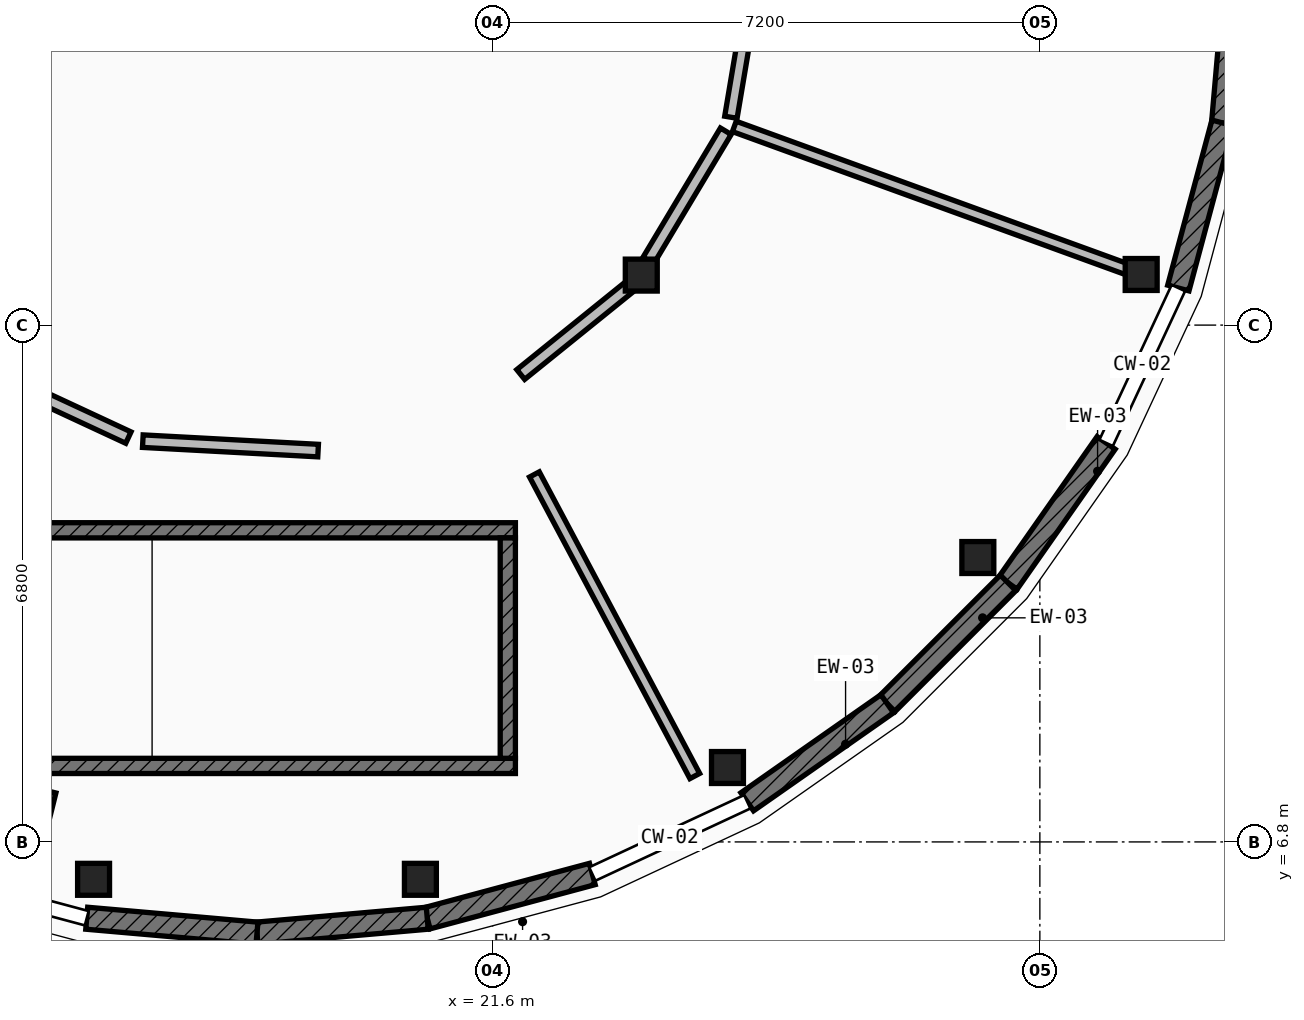
"""IFC4 building model, lengths in metres.
Left out: names, types, materials, properties, quantities, classifications, styles, units other than length and angle.
Written with IfcOpenShell. Run it as: python <this file> out.ifc"""

import sys

from ifc_helpers import new_model, si_unit, direction, frame, frame_2d, origin, origin_2d, place, context, subcontext, project, spatial, rectangle, extrude, element, fill, save


model = new_model("IFC4")
c1 = context("Model", 3, precision=1e-05, world=origin(), true_north=direction((0.0, 1.0)))
c2 = subcontext(c1, "Body", "Model", "MODEL_VIEW")
j1 = project(units=[si_unit("LENGTHUNIT", "METRE"), si_unit("PLANEANGLEUNIT", "RADIAN")], contexts=[c1])
p1 = place(None, origin())
s1 = spatial("IfcSite", under=j1, at=p1, CompositionType="ELEMENT")
p2 = place(p1, origin())
s2 = spatial("IfcBuilding", under=s1, at=p2, CompositionType="ELEMENT")
p3 = place(p2, frame((0.0, 0.0, 4.55)))
s3 = spatial("IfcBuildingStorey", under=s2, at=p3, CompositionType="ELEMENT", Elevation=4.55)
for number, where, z_axis, x_axis in (
    (1, (16.35, 6.308, 0.0), (0.0, 0.0, 1.0), (1.0, 0.0, 0.0)),
    (2, (20.65, 6.308, 0.0), (0.0, 0.0, 1.0), (1.0, 0.0, 0.0)),
    (3, (24.69, 7.779, 0.0), (0.0, 0.0, 1.0), (1.0, 0.0, 0.0)),
    (4, (27.984, 10.542, 0.0), (0.0, 0.0, 1.0), (1.0, 0.0, 0.0)),
    (5, (30.133, 14.266, 0.0), (0.0, 0.0, 1.0), (1.0, 0.0, 0.0)),
    (6, (23.556, 14.258, 0.0), (0.0, 0.0, 1.0), (1.0, 0.0, 0.0)),
):
    element("IfcColumn", number, at=place(p3, frame(where, z_axis=z_axis, x_axis=x_axis)), inside=s3, PredefinedType="COLUMN", context=c2, shape_type="SweptSolid", body=[
        extrude(rectangle(XDim=0.42, YDim=0.42, at=origin_2d()), origin(), (0.0, 0.0, 1.0), 4.2),
    ])
p4 = place(p3, frame((31.4, 18.5, 0.0), z_axis=(0.0, 0.0, 1.0), x_axis=(-0.087079400775, -0.996201374201, 0.0)))
e7 = element("IfcWall", 7, at=p4, inside=s3, PredefinedType="ELEMENTEDWALL", context=c2, shape_type="SweptSolid", body=[
    extrude(rectangle(XDim=2.249, YDim=0.29, at=frame_2d((1.124, 0.0))), origin(), (0.0, 0.0, 1.0), 3.309),
])
p5 = place(p4, frame((0.574, 0.0, 0.85)))
e8 = element("IfcOpeningElement", 8, at=p5, cuts=e7, PredefinedType="OPENING", context=c2, shape_type="SweptSolid", body=[
    extrude(rectangle(XDim=1.1, YDim=1.5, at=frame_2d((0.55, 0.75))), frame((0.0, 0.155, 0.0), z_axis=(0.0, -1.0, 0.0), x_axis=(1.0, 0.0, 0.0)), (0.0, 0.0, 1.0), 0.31),
])
p6 = place(p3, frame((31.204, 16.26, 0.0), z_axis=(0.0, 0.0, 1.0), x_axis=(-0.258824721145, -0.96592430538, 0.0)))
e9 = element("IfcWall", 9, at=p6, inside=s3, PredefinedType="ELEMENTEDWALL", context=c2, shape_type="SweptSolid", body=[
    extrude(rectangle(XDim=2.249, YDim=0.29, at=frame_2d((1.125, 0.0))), origin(), (0.0, 0.0, 1.0), 3.309),
])
p7 = place(p6, frame((0.574, 0.0, 0.85)))
e10 = element("IfcOpeningElement", 10, at=p7, cuts=e9, PredefinedType="OPENING", context=c2, shape_type="SweptSolid", body=[
    extrude(rectangle(XDim=1.1, YDim=1.85, at=frame_2d((0.55, 0.925))), frame((0.0, 0.155, 0.0), z_axis=(0.0, -1.0, 0.0), x_axis=(1.0, 0.0, 0.0)), (0.0, 0.0, 1.0), 0.31),
])
p8 = place(p3, frame((29.672, 12.05, 0.0), z_axis=(0.0, 0.0, 1.0), x_axis=(-0.573644482107, -0.819104393925, 0.0)))
e11 = element("IfcWall", 11, at=p8, inside=s3, PredefinedType="ELEMENTEDWALL", context=c2, shape_type="SweptSolid", body=[
    extrude(rectangle(XDim=2.249, YDim=0.29, at=frame_2d((1.125, 0.0))), origin(), (0.0, 0.0, 1.0), 3.309),
])
p9 = place(p8, frame((0.574, 0.0, 0.85)))
e12 = element("IfcOpeningElement", 12, at=p9, cuts=e11, PredefinedType="OPENING", context=c2, shape_type="SweptSolid", body=[
    extrude(rectangle(XDim=1.1, YDim=2.1, at=frame_2d((0.55, 1.05))), frame((0.0, 0.155, 0.0), z_axis=(0.0, -1.0, 0.0), x_axis=(1.0, 0.0, 0.0)), (0.0, 0.0, 1.0), 0.31),
])
p10 = place(p3, frame((28.382, 10.208, 0.0), z_axis=(0.0, 0.0, 1.0), x_axis=(-0.707106781187, -0.707106781187, 0.0)))
e13 = element("IfcWall", 13, at=p10, inside=s3, PredefinedType="ELEMENTEDWALL", context=c2, shape_type="SweptSolid", body=[
    extrude(rectangle(XDim=2.249, YDim=0.29, at=frame_2d((1.125, 0.0))), origin(), (0.0, 0.0, 1.0), 3.309),
])
p11 = place(p10, frame((0.564, 0.0, 0.85)))
e14 = element("IfcOpeningElement", 14, at=p11, cuts=e13, PredefinedType="OPENING", context=c2, shape_type="SweptSolid", body=[
    extrude(rectangle(XDim=1.12, YDim=1.65, at=frame_2d((0.56, 0.825))), frame((0.0, 0.155, 0.0), z_axis=(0.0, -1.0, 0.0), x_axis=(1.0, 0.0, 0.0)), (0.0, 0.0, 1.0), 0.31),
])
p12 = place(p3, frame((26.792, 8.618, 0.0), z_axis=(0.0, 0.0, 1.0), x_axis=(-0.819104393925, -0.573644482107, 0.0)))
e15 = element("IfcWall", 15, at=p12, inside=s3, PredefinedType="ELEMENTEDWALL", context=c2, shape_type="SweptSolid", body=[
    extrude(rectangle(XDim=2.249, YDim=0.29, at=frame_2d((1.125, 0.0))), origin(), (0.0, 0.0, 1.0), 3.309),
])
p13 = place(p12, frame((0.549, 0.0, 0.85)))
e16 = element("IfcOpeningElement", 16, at=p13, cuts=e15, PredefinedType="OPENING", context=c2, shape_type="SweptSolid", body=[
    extrude(rectangle(XDim=1.15, YDim=1.4, at=frame_2d((0.575, 0.7))), frame((0.0, 0.155, 0.0), z_axis=(0.0, -1.0, 0.0), x_axis=(1.0, 0.0, 0.0)), (0.0, 0.0, 1.0), 0.31),
])
p14 = place(p3, frame((22.912, 6.378, 0.0), z_axis=(0.0, 0.0, 1.0), x_axis=(-0.96592430538, -0.258824721145, 0.0)))
e17 = element("IfcWall", 17, at=p14, inside=s3, PredefinedType="ELEMENTEDWALL", context=c2, shape_type="SweptSolid", body=[
    extrude(rectangle(XDim=2.249, YDim=0.29, at=frame_2d((1.125, 0.0))), origin(), (0.0, 0.0, 1.0), 3.309),
])
p15 = place(p14, frame((0.549, 0.0, 0.85)))
e18 = element("IfcOpeningElement", 18, at=p15, cuts=e17, PredefinedType="OPENING", context=c2, shape_type="SweptSolid", body=[
    extrude(rectangle(XDim=1.15, YDim=1.7, at=frame_2d((0.575, 0.85))), frame((0.0, 0.155, 0.0), z_axis=(0.0, -1.0, 0.0), x_axis=(1.0, 0.0, 0.0)), (0.0, 0.0, 1.0), 0.31),
])
for number, where, z_axis, x_axis in (
    (19, (20.74, 5.796, 0.0), (0.0, 0.0, 1.0), (-0.996, -0.087, 0.0)),
    (20, (18.5, 5.6, 0.0), (0.0, 0.0, 1.0), (-0.996, 0.087, 0.0)),
):
    element("IfcWall", number, at=place(p3, frame(where, z_axis=z_axis, x_axis=x_axis)), inside=s3, PredefinedType="ELEMENTEDWALL", context=c2, shape_type="SweptSolid", body=[
        extrude(rectangle(XDim=2.249, YDim=0.29, at=frame_2d((1.124, 0.0))), origin(), (0.0, 0.0, 1.0), 3.309),
    ])
p16 = place(p3, frame((21.9, 10.9, 0.0), z_axis=(0.0, 0.0, 1.0), x_axis=(-1.0, 0.0, 0.0)))
e21 = element("IfcWall", 21, at=p16, inside=s3, PredefinedType="SHEAR", context=c2, shape_type="SweptSolid", body=[
    extrude(rectangle(XDim=6.8, YDim=0.2, at=frame_2d((3.4, 0.0))), origin(), (0.0, 0.0, 1.0), 3.955),
])
p17 = place(p16, frame((0.38, 0.0, 0.0)))
e22 = element("IfcOpeningElement", 22, at=p17, cuts=e21, PredefinedType="OPENING", context=c2, shape_type="SweptSolid", body=[
    extrude(rectangle(XDim=1.05, YDim=2.15, at=frame_2d((0.525, 1.075))), frame((0.0, 0.11, 0.0), z_axis=(0.0, -1.0, 0.0), x_axis=(1.0, 0.0, 0.0)), (0.0, 0.0, 1.0), 0.22),
])
p18 = place(p3, frame((21.9, 7.8, 0.0), z_axis=(0.0, 0.0, 1.0), x_axis=(-1.0, 0.0, 0.0)))
e23 = element("IfcWall", 23, at=p18, inside=s3, PredefinedType="SHEAR", context=c2, shape_type="SweptSolid", body=[
    extrude(rectangle(XDim=6.8, YDim=0.2, at=frame_2d((3.4, 0.0))), origin(), (0.0, 0.0, 1.0), 3.955),
])
p19 = place(p3, frame((21.8, 10.8, 0.0), z_axis=(0.0, 0.0, 1.0), x_axis=(0.0, -1.0, 0.0)))
e24 = element("IfcWall", 24, at=p19, inside=s3, PredefinedType="SHEAR", context=c2, shape_type="SweptSolid", body=[
    extrude(rectangle(XDim=2.9, YDim=0.2, at=frame_2d((1.45, 0.0))), origin(), (0.0, 0.0, 1.0), 3.955),
])
p20 = place(p3, frame((15.75, 7.47, 0.0), z_axis=(0.0, 0.0, 1.0), x_axis=(-0.241627935272, -0.970368971524, 0.0)))
e25 = element("IfcWall", 25, at=p20, inside=s3, PredefinedType="SOLIDWALL", context=c2, shape_type="SweptSolid", body=[
    extrude(rectangle(XDim=0.886, YDim=0.215, at=frame_2d((0.443, 0.0))), origin(), (0.0, 0.0, 1.0), 3.284),
])
p21 = place(p3, frame((22.15, 11.635, 0.0), z_axis=(0.0, 0.0, 1.0), x_axis=(0.469519274504, -0.882922222435, 0.0)))
e26 = element("IfcWall", 26, at=p21, inside=s3, PredefinedType="PARTITIONING", context=c2, shape_type="SweptSolid", body=[
    extrude(rectangle(XDim=4.494, YDim=0.145, at=frame_2d((2.247, 0.0))), origin(), (0.0, 0.0, 1.0), 3.284),
])
p22 = place(p3, frame((24.78, 16.214, 0.0), z_axis=(0.0, 0.0, 1.0), x_axis=(0.939718505705, -0.341949016719, 0.0)))
e27 = element("IfcWall", 27, at=p22, inside=s3, PredefinedType="PARTITIONING", context=c2, shape_type="SweptSolid", body=[
    extrude(rectangle(XDim=5.615, YDim=0.145, at=frame_2d((2.808, 0.0))), origin(), (0.0, 0.0, 1.0), 3.284),
])
for number, where, z_axis, x_axis in (
    (28, (14.714, 13.094, 0.0), (0.0, 0.0, 1.0), (0.907, -0.422, 0.0)),
    (29, (16.998, 12.073, 0.0), (0.0, 0.0, 1.0), (0.999, -0.054, 0.0)),
):
    element("IfcWall", number, at=place(p3, frame(where, z_axis=z_axis, x_axis=x_axis)), inside=s3, PredefinedType="PARTITIONING", context=c2, shape_type="SweptSolid", body=[
        extrude(rectangle(XDim=2.309, YDim=0.165, at=frame_2d((1.155, 0.0))), origin(), (0.0, 0.0, 1.0), 3.284),
    ])
p23 = place(p3, frame((21.97, 12.95, 0.0), z_axis=(0.0, 0.0, 1.0), x_axis=(0.778080714505, 0.62816431108, 0.0)))
e30 = element("IfcWall", 30, at=p23, inside=s3, PredefinedType="PARTITIONING", context=c2, shape_type="SweptSolid", body=[
    extrude(rectangle(XDim=1.842, YDim=0.165, at=frame_2d((0.921, 0.0))), origin(), (0.0, 0.0, 1.0), 3.284),
])
p24 = place(p23, frame((0.466, 0.0, 0.0)))
e31 = element("IfcOpeningElement", 31, at=p24, cuts=e30, PredefinedType="OPENING", context=c2, shape_type="SweptSolid", body=[
    extrude(rectangle(XDim=0.91, YDim=2.15, at=frame_2d((0.455, 1.075))), frame((0.0, 0.093, 0.0), z_axis=(0.0, -1.0, 0.0), x_axis=(1.0, 0.0, 0.0)), (0.0, 0.0, 1.0), 0.185),
])
p25 = place(p3, frame((23.65, 14.451, 0.0), z_axis=(0.0, 0.0, 1.0), x_axis=(0.513788930693, 0.85791662456, 0.0)))
e32 = element("IfcWall", 32, at=p25, inside=s3, PredefinedType="PARTITIONING", context=c2, shape_type="SweptSolid", body=[
    extrude(rectangle(XDim=1.981, YDim=0.165, at=frame_2d((0.991, 0.0))), origin(), (0.0, 0.0, 1.0), 3.284),
])
p26 = place(p3, frame((24.735, 16.335, 0.0), z_axis=(0.0, 0.0, 1.0), x_axis=(0.166037850653, 0.986119380273, 0.0)))
e33 = element("IfcWall", 33, at=p26, inside=s3, PredefinedType="PARTITIONING", context=c2, shape_type="SweptSolid", body=[
    extrude(rectangle(XDim=1.981, YDim=0.165, at=frame_2d((0.99, 0.0))), origin(), (0.0, 0.0, 1.0), 3.284),
])
p27 = place(p26, frame((0.525, 0.0, 0.0)))
e34 = element("IfcOpeningElement", 34, at=p27, cuts=e33, PredefinedType="OPENING", context=c2, shape_type="SweptSolid", body=[
    extrude(rectangle(XDim=0.93, YDim=2.18, at=frame_2d((0.465, 1.09))), frame((0.0, 0.093, 0.0), z_axis=(0.0, -1.0, 0.0), x_axis=(1.0, 0.0, 0.0)), (0.0, 0.0, 1.0), 0.185),
])
p28 = place(p7, origin())
e35 = element("IfcWindow", 35, at=p28, inside=s3, PartitioningType="SINGLE_PANEL", PredefinedType="WINDOW", context=c2, shape_type="SweptSolid", body=[
    extrude(rectangle(XDim=1.1, YDim=1.85, at=frame_2d((0.55, 0.925))), frame((0.0, 0.03, 0.0), z_axis=(0.0, -1.0, 0.0), x_axis=(1.0, 0.0, 0.0)), (0.0, 0.0, 1.0), 0.06),
])
fill(e10, e35)
p29 = place(p9, origin())
e36 = element("IfcWindow", 36, at=p29, inside=s3, PartitioningType="SINGLE_PANEL", PredefinedType="WINDOW", context=c2, shape_type="SweptSolid", body=[
    extrude(rectangle(XDim=1.1, YDim=2.1, at=frame_2d((0.55, 1.05))), frame((0.0, 0.03, 0.0), z_axis=(0.0, -1.0, 0.0), x_axis=(1.0, 0.0, 0.0)), (0.0, 0.0, 1.0), 0.06),
])
fill(e12, e36)
p30 = place(p11, origin())
e37 = element("IfcWindow", 37, at=p30, inside=s3, PartitioningType="SINGLE_PANEL", PredefinedType="WINDOW", context=c2, shape_type="SweptSolid", body=[
    extrude(rectangle(XDim=1.12, YDim=1.65, at=frame_2d((0.56, 0.825))), frame((0.0, 0.03, 0.0), z_axis=(0.0, -1.0, 0.0), x_axis=(1.0, 0.0, 0.0)), (0.0, 0.0, 1.0), 0.06),
])
fill(e14, e37)
p31 = place(p13, origin())
e38 = element("IfcWindow", 38, at=p31, inside=s3, PartitioningType="SINGLE_PANEL", PredefinedType="WINDOW", context=c2, shape_type="SweptSolid", body=[
    extrude(rectangle(XDim=1.15, YDim=1.4, at=frame_2d((0.575, 0.7))), frame((0.0, 0.03, 0.0), z_axis=(0.0, -1.0, 0.0), x_axis=(1.0, 0.0, 0.0)), (0.0, 0.0, 1.0), 0.06),
])
fill(e16, e38)
p32 = place(p15, origin())
e39 = element("IfcWindow", 39, at=p32, inside=s3, PartitioningType="SINGLE_PANEL", PredefinedType="WINDOW", context=c2, shape_type="SweptSolid", body=[
    extrude(rectangle(XDim=1.15, YDim=1.7, at=frame_2d((0.575, 0.85))), frame((0.0, 0.03, 0.0), z_axis=(0.0, -1.0, 0.0), x_axis=(1.0, 0.0, 0.0)), (0.0, 0.0, 1.0), 0.06),
])
fill(e18, e39)
p33 = place(p17, origin())
e40 = element("IfcDoor", 40, at=p33, inside=s3, OperationType="SINGLE_SWING_LEFT", PredefinedType="DOOR", context=c2, shape_type="SweptSolid", body=[
    extrude(rectangle(XDim=1.05, YDim=2.15, at=frame_2d((0.525, 1.075))), frame((0.0, 0.025, 0.0), z_axis=(0.0, -1.0, 0.0), x_axis=(1.0, 0.0, 0.0)), (0.0, 0.0, 1.0), 0.05),
])
fill(e22, e40)
p34 = place(p24, origin())
e41 = element("IfcDoor", 41, at=p34, inside=s3, OperationType="SINGLE_SWING_RIGHT", PredefinedType="DOOR", context=c2, shape_type="SweptSolid", body=[
    extrude(rectangle(XDim=0.91, YDim=2.15, at=frame_2d((0.455, 1.075))), frame((0.0, 0.025, 0.0), z_axis=(0.0, -1.0, 0.0), x_axis=(1.0, 0.0, 0.0)), (0.0, 0.0, 1.0), 0.05),
])
fill(e31, e41)
p35 = place(p27, origin())
e42 = element("IfcDoor", 42, at=p35, inside=s3, OperationType="SINGLE_SWING_LEFT", PredefinedType="DOOR", context=c2, shape_type="SweptSolid", body=[
    extrude(rectangle(XDim=0.93, YDim=2.18, at=frame_2d((0.465, 1.09))), frame((0.0, 0.025, 0.0), z_axis=(0.0, -1.0, 0.0), x_axis=(1.0, 0.0, 0.0)), (0.0, 0.0, 1.0), 0.05),
])
fill(e34, e42)
save(model, sys.argv[1])
